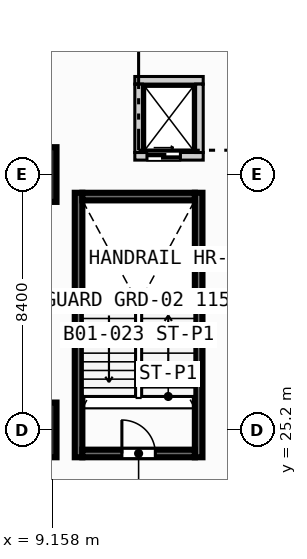
"""IFC4 building model, lengths in metres.
Left out: names, types, materials, properties, quantities, classifications, styles, units other than length and angle.
Written with IfcOpenShell. Run it as: python <this file> out.ifc"""

import sys

from ifc_helpers import new_model, si_unit, direction, frame, frame_2d, origin, origin_2d, place, context, subcontext, project, spatial, rectangle, extrude, element, fill, save


model = new_model("IFC4")
c1 = context("Model", 3, precision=1e-05, world=origin(), true_north=direction((0.0, 1.0)))
c2 = subcontext(c1, "Body", "Model", "MODEL_VIEW")
j1 = project(units=[si_unit("LENGTHUNIT", "METRE"), si_unit("PLANEANGLEUNIT", "RADIAN")], contexts=[c1])
p1 = place(None, origin())
s1 = spatial("IfcSite", under=j1, at=p1, CompositionType="ELEMENT")
p2 = place(p1, origin())
s2 = spatial("IfcBuilding", under=s1, at=p2, CompositionType="ELEMENT")
p3 = place(p2, frame((0.0, 0.0, -4.2)))
s3 = spatial("IfcBuildingStorey", under=s2, at=p3, CompositionType="ELEMENT", Elevation=-4.2)
for number, where, z_axis, x_axis in (
    (1, (10.025, 24.3, 0.0), (0.0, 0.0, 1.0), (0.0, 1.0, 0.0)),
    (2, (13.975, 24.3, 0.0), (0.0, 0.0, 1.0), (0.0, 1.0, 0.0)),
):
    element("IfcWall", number, at=place(p3, frame(where, z_axis=z_axis, x_axis=x_axis)), inside=s3, PredefinedType="SOLIDWALL", context=c2, shape_type="SweptSolid", body=[
        extrude(rectangle(XDim=8.7, YDim=0.25, at=frame_2d((4.35, 0.0))), origin(), (0.0, 0.0, 1.0), 3.85),
    ])
p4 = place(p3, frame((10.15, 32.875, 0.0), z_axis=(0.0, 0.0, 1.0), x_axis=(1.0, 0.0, 0.0)))
e3 = element("IfcWall", 3, at=p4, inside=s3, PredefinedType="SOLIDWALL", context=c2, shape_type="SweptSolid", body=[
    extrude(rectangle(XDim=3.7, YDim=0.25, at=frame_2d((1.85, 0.0))), origin(), (0.0, 0.0, 1.0), 3.85),
])
for number, where, z_axis, x_axis in (
    (4, (8.4, 25.2, 0.0), (0.0, 0.0, 1.0), (1.0, 0.0, 0.0)),
    (5, (8.4, 33.6, 0.0), (0.0, 0.0, 1.0), (1.0, 0.0, 0.0)),
):
    element("IfcColumn", number, at=place(p3, frame(where, z_axis=z_axis, x_axis=x_axis)), inside=s3, PredefinedType="COLUMN", context=c2, shape_type="SweptSolid", body=[
        extrude(rectangle(XDim=1.8, YDim=1.8, at=origin_2d()), origin(), (0.0, 0.0, 1.0), 4.2),
    ])
p5 = place(p3, frame((11.875, 34.2, 0.0), z_axis=(0.0, 0.0, 1.0), x_axis=(1.0, 0.0, 0.0)))
e6 = element("IfcWall", 6, at=p5, inside=s3, PredefinedType="SOLIDWALL", context=c2, shape_type="SweptSolid", body=[
    extrude(rectangle(XDim=2.25, YDim=0.25, at=frame_2d((1.125, 0.0))), origin(), (0.0, 0.0, 1.0), 3.85),
])
p6 = place(p5, frame((0.4, 0.0, 0.0)))
e7 = element("IfcOpeningElement", 7, at=p6, cuts=e6, PredefinedType="OPENING", context=c2, shape_type="SweptSolid", body=[
    extrude(rectangle(XDim=1.1, YDim=2.15, at=frame_2d((0.55, 1.075))), frame((0.0, 0.135, 0.0), z_axis=(0.0, -1.0, 0.0), x_axis=(1.0, 0.0, 0.0)), (0.0, 0.0, 1.0), 0.27),
])
for number, where, z_axis, x_axis in (
    (8, (11.875, 36.7, 0.0), (0.0, 0.0, 1.0), (1.0, 0.0, 0.0)),
    (9, (12.0, 34.325, 0.0), (0.0, 0.0, 1.0), (0.0, 1.0, 0.0)),
    (10, (14.0, 34.325, 0.0), (0.0, 0.0, 1.0), (0.0, 1.0, 0.0)),
):
    element("IfcWall", number, at=place(p3, frame(where, z_axis=z_axis, x_axis=x_axis)), inside=s3, PredefinedType="SOLIDWALL", context=c2, shape_type="SweptSolid", body=[
        extrude(rectangle(XDim=2.25, YDim=0.25, at=frame_2d((1.125, 0.0))), origin(), (0.0, 0.0, 1.0), 3.85),
    ])
p7 = place(p3, frame((10.15, 24.425, 0.0), z_axis=(0.0, 0.0, 1.0), x_axis=(1.0, 0.0, 0.0)))
e11 = element("IfcWall", 11, at=p7, inside=s3, PredefinedType="SOLIDWALL", context=c2, shape_type="SweptSolid", body=[
    extrude(rectangle(XDim=3.7, YDim=0.25, at=frame_2d((1.85, 0.0))), origin(), (0.0, 0.0, 1.0), 3.85),
])
p8 = place(p7, frame((1.3, 0.0, 0.0)))
e12 = element("IfcOpeningElement", 12, at=p8, cuts=e11, PredefinedType="OPENING", context=c2, shape_type="SweptSolid", body=[
    extrude(rectangle(XDim=1.1, YDim=2.15, at=frame_2d((0.55, 1.075))), frame((0.0, 0.135, 0.0), z_axis=(0.0, -1.0, 0.0), x_axis=(1.0, 0.0, 0.0)), (0.0, 0.0, 1.0), 0.27),
])
p9 = place(p6, origin())
e13 = element("IfcDoor", 13, at=p9, inside=s3, OperationType="SLIDING_TO_LEFT", PredefinedType="DOOR", context=c2, shape_type="SweptSolid", body=[
    extrude(rectangle(XDim=1.1, YDim=2.15, at=frame_2d((0.55, 1.075))), frame((0.0, 0.025, 0.0), z_axis=(0.0, -1.0, 0.0), x_axis=(1.0, 0.0, 0.0)), (0.0, 0.0, 1.0), 0.05),
])
fill(e7, e13)
p10 = place(p8, origin())
e14 = element("IfcDoor", 14, at=p10, inside=s3, OperationType="SINGLE_SWING_LEFT", PredefinedType="DOOR", context=c2, shape_type="SweptSolid", body=[
    extrude(rectangle(XDim=1.1, YDim=2.15, at=frame_2d((0.55, 1.075))), frame((0.0, 0.025, 0.0), z_axis=(0.0, -1.0, 0.0), x_axis=(1.0, 0.0, 0.0)), (0.0, 0.0, 1.0), 0.05),
])
fill(e12, e14)
save(model, sys.argv[1])
